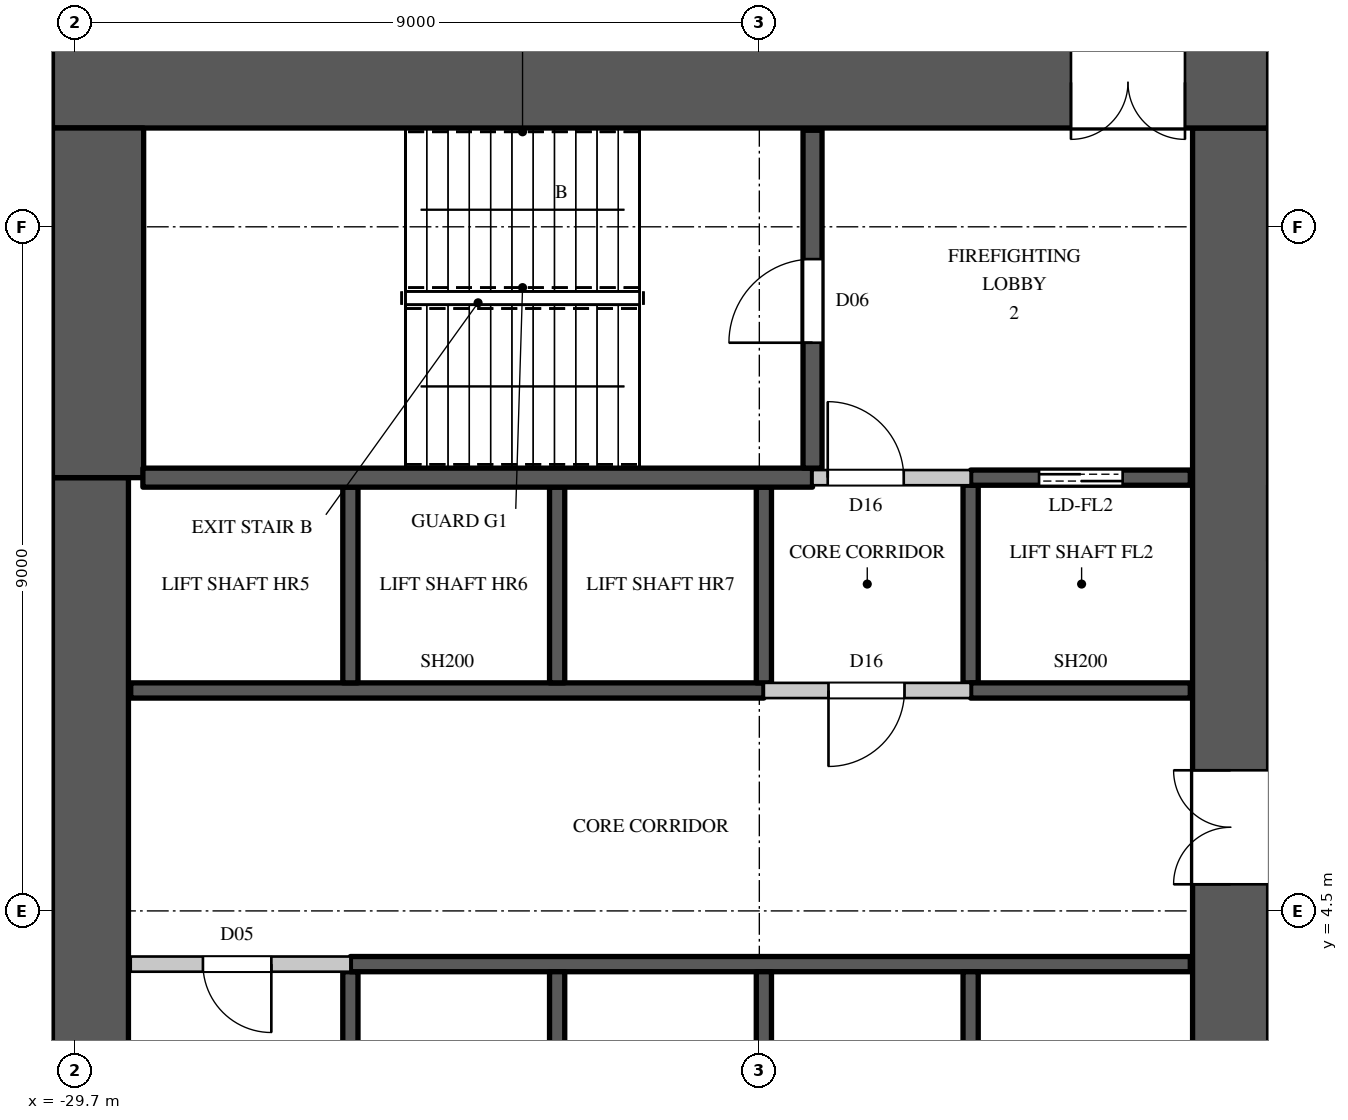
"""IFC4 building model, lengths in metres.
Left out: names, types, materials, properties, quantities, classifications, styles, units other than length and angle.
Written with IfcOpenShell. Run it as: python <this file> out.ifc"""

import sys

from ifc_helpers import new_model, si_unit, direction, frame, frame_2d, origin, place, context, subcontext, project, spatial, rectangle, extrude, element, fill, save


model = new_model("IFC4")
c1 = context("Model", 3, precision=1e-05, world=origin(), true_north=direction((0.0, 1.0)))
c2 = subcontext(c1, "Body", "Model", "MODEL_VIEW")
j1 = project(units=[si_unit("LENGTHUNIT", "METRE"), si_unit("PLANEANGLEUNIT", "RADIAN")], contexts=[c1])
p1 = place(None, origin())
s1 = spatial("IfcSite", under=j1, at=p1, CompositionType="ELEMENT")
p2 = place(p1, origin())
s2 = spatial("IfcBuilding", under=s1, at=p2, CompositionType="ELEMENT")
p3 = place(p2, frame((0.0, 0.0, 152.5)))
s3 = spatial("IfcBuildingStorey", under=s2, at=p3, CompositionType="ELEMENT", Elevation=152.5)
p4 = place(p3, frame((-30.0, 15.4, 0.0), z_axis=(0.0, 0.0, 1.0), x_axis=(1.0, 0.0, 0.0)))
e1 = element("IfcWall", 1, at=p4, inside=s3, PredefinedType="SHEAR", context=c2, shape_type="SweptSolid", body=[
    extrude(rectangle(XDim=16.0, YDim=1.2, at=frame_2d((8.0, 0.0))), origin(), (0.0, 0.0, 1.0), 8.0),
])
p5 = place(p4, frame((13.4, 0.0, 0.0)))
e2 = element("IfcOpeningElement", 2, at=p5, cuts=e1, PredefinedType="OPENING", context=c2, shape_type="SweptSolid", body=[
    extrude(rectangle(XDim=1.5, YDim=2.4, at=frame_2d((0.75, 1.2))), frame((0.0, 0.61, 0.0), z_axis=(0.0, -1.0, 0.0), x_axis=(1.0, 0.0, 0.0)), (0.0, 0.0, 1.0), 1.22),
])
p6 = place(p3, frame((-14.5, -14.8, 0.0), z_axis=(0.0, 0.0, 1.0), x_axis=(0.0, 1.0, 0.0)))
e3 = element("IfcWall", 3, at=p6, inside=s3, PredefinedType="SHEAR", context=c2, shape_type="SweptSolid", body=[
    extrude(rectangle(XDim=29.6, YDim=1.0, at=frame_2d((14.8, 0.0))), origin(), (0.0, 0.0, 1.0), 8.0),
])
p7 = place(p6, frame((8.45, 0.0, 0.0)))
e4 = element("IfcOpeningElement", 4, at=p7, cuts=e3, PredefinedType="OPENING", context=c2, shape_type="SweptSolid", body=[
    extrude(rectangle(XDim=1.5, YDim=2.4, at=frame_2d((0.75, 1.2))), frame((0.0, 0.51, 0.0), z_axis=(0.0, -1.0, 0.0), x_axis=(1.0, 0.0, 0.0)), (0.0, 0.0, 1.0), 1.02),
])
p8 = place(p6, frame((19.65, 0.0, 0.0)))
e5 = element("IfcOpeningElement", 5, at=p8, cuts=e3, PredefinedType="OPENING", context=c2, shape_type="SweptSolid", body=[
    extrude(rectangle(XDim=1.5, YDim=2.4, at=frame_2d((0.75, 1.2))), frame((0.0, 0.51, 0.0), z_axis=(0.0, -1.0, 0.0), x_axis=(1.0, 0.0, 0.0)), (0.0, 0.0, 1.0), 1.02),
])
p9 = place(p6, frame((14.5, 0.0, 0.0)))
e6 = element("IfcOpeningElement", 6, at=p9, cuts=e3, PredefinedType="OPENING", context=c2, shape_type="SweptSolid", body=[
    extrude(rectangle(XDim=0.6, YDim=2.0, at=frame_2d((0.3, 1.0))), frame((0.0, 0.51, 0.0), z_axis=(0.0, -1.0, 0.0), x_axis=(1.0, 0.0, 0.0)), (0.0, 0.0, 1.0), 1.02),
])
p10 = place(p3, frame((-29.5, -10.2, 0.0), z_axis=(0.0, 0.0, 1.0), x_axis=(0.0, 1.0, 0.0)))
e7 = element("IfcWall", 7, at=p10, inside=s3, PredefinedType="SHEAR", context=c2, shape_type="SweptSolid", body=[
    extrude(rectangle(XDim=20.4, YDim=1.0, at=frame_2d((10.2, 0.0))), origin(), (0.0, 0.0, 1.0), 8.0),
])
p11 = place(p3, frame((-29.4, 10.2, 0.0), z_axis=(0.0, 0.0, 1.0), x_axis=(0.0, 1.0, 0.0)))
e8 = element("IfcWall", 8, at=p11, inside=s3, PredefinedType="SHEAR", context=c2, shape_type="SweptSolid", body=[
    extrude(rectangle(XDim=4.6, YDim=1.2, at=frame_2d((2.3, 0.0))), origin(), (0.0, 0.0, 1.0), 8.0),
])
p12 = place(p3, frame((-28.97, 3.8, 0.0), z_axis=(0.0, 0.0, 1.0), x_axis=(1.0, 0.0, 0.0)))
e9 = element("IfcWall", 9, at=p12, inside=s3, PredefinedType="PARTITIONING", context=c2, shape_type="SweptSolid", body=[
    extrude(rectangle(XDim=2.89, YDim=0.2, at=frame_2d((1.445, 0.0))), origin(), (0.0, 0.0, 1.0), 7.7),
])
p13 = place(p12, frame((0.95, 0.0, 0.0)))
e10 = element("IfcOpeningElement", 10, at=p13, cuts=e9, PredefinedType="OPENING", context=c2, shape_type="SweptSolid", body=[
    extrude(rectangle(XDim=0.9, YDim=2.2, at=frame_2d((0.45, 1.1))), frame((0.0, 0.11, 0.0), z_axis=(0.0, -1.0, 0.0), x_axis=(1.0, 0.0, 0.0)), (0.0, 0.0, 1.0), 0.22),
])
p14 = place(p3, frame((-20.64, 7.4, 0.0), z_axis=(0.0, 0.0, 1.0), x_axis=(1.0, 0.0, 0.0)))
e11 = element("IfcWall", 11, at=p14, inside=s3, PredefinedType="PARTITIONING", context=c2, shape_type="SweptSolid", body=[
    extrude(rectangle(XDim=2.72, YDim=0.2, at=frame_2d((1.36, 0.0))), origin(), (0.0, 0.0, 1.0), 7.7),
])
p15 = place(p14, frame((0.85, 0.0, 0.0)))
e12 = element("IfcOpeningElement", 12, at=p15, cuts=e11, PredefinedType="OPENING", context=c2, shape_type="SweptSolid", body=[
    extrude(rectangle(XDim=1.0, YDim=2.2, at=frame_2d((0.5, 1.1))), frame((0.0, 0.11, 0.0), z_axis=(0.0, -1.0, 0.0), x_axis=(1.0, 0.0, 0.0)), (0.0, 0.0, 1.0), 0.22),
])
p16 = place(p3, frame((-20.0, 10.2, 0.0), z_axis=(0.0, 0.0, 1.0), x_axis=(1.0, 0.0, 0.0)))
e13 = element("IfcWall", 13, at=p16, inside=s3, PredefinedType="PARTITIONING", context=c2, shape_type="SweptSolid", body=[
    extrude(rectangle(XDim=2.08, YDim=0.2, at=frame_2d((1.04, 0.0))), origin(), (0.0, 0.0, 1.0), 7.7),
])
p17 = place(p16, frame((0.2, 0.0, 0.0)))
e14 = element("IfcOpeningElement", 14, at=p17, cuts=e13, PredefinedType="OPENING", context=c2, shape_type="SweptSolid", body=[
    extrude(rectangle(XDim=1.0, YDim=2.2, at=frame_2d((0.5, 1.1))), frame((0.0, 0.11, 0.0), z_axis=(0.0, -1.0, 0.0), x_axis=(1.0, 0.0, 0.0)), (0.0, 0.0, 1.0), 0.22),
])
p18 = place(p3, frame((-28.97, 7.4, 0.0), z_axis=(0.0, 0.0, 1.0), x_axis=(1.0, 0.0, 0.0)))
e15 = element("IfcWall", 15, at=p18, inside=s3, PredefinedType="SHEAR", context=c2, shape_type="SweptSolid", body=[
    extrude(rectangle(XDim=8.33, YDim=0.2, at=frame_2d((4.165, 0.0))), origin(), (0.0, 0.0, 1.0), 7.7),
])
p19 = place(p3, frame((-26.08, 1.1, 0.0), z_axis=(0.0, 0.0, 1.0), x_axis=(0.0, 1.0, 0.0)))
e16 = element("IfcWall", 16, at=p19, inside=s3, PredefinedType="SHEAR", context=c2, shape_type="SweptSolid", body=[
    extrude(rectangle(XDim=2.6, YDim=0.2, at=frame_2d((1.3, 0.0))), origin(), (0.0, 0.0, 1.0), 7.7),
])
p20 = place(p3, frame((-26.08, 3.8, 0.0), z_axis=(0.0, 0.0, 1.0), x_axis=(1.0, 0.0, 0.0)))
e17 = element("IfcWall", 17, at=p20, inside=s3, PredefinedType="SHEAR", context=c2, shape_type="SweptSolid", body=[
    extrude(rectangle(XDim=11.05, YDim=0.2, at=frame_2d((5.525, 0.0))), origin(), (0.0, 0.0, 1.0), 7.7),
])
p21 = place(p3, frame((-26.08, 7.5, 0.0), z_axis=(0.0, 0.0, 1.0), x_axis=(0.0, 1.0, 0.0)))
e18 = element("IfcWall", 18, at=p21, inside=s3, PredefinedType="SHEAR", context=c2, shape_type="SweptSolid", body=[
    extrude(rectangle(XDim=2.575, YDim=0.2, at=frame_2d((1.288, 0.0))), origin(), (0.0, 0.0, 1.0), 8.0),
])
p22 = place(p3, frame((-23.36, 1.1, 0.0), z_axis=(0.0, 0.0, 1.0), x_axis=(0.0, 1.0, 0.0)))
e19 = element("IfcWall", 19, at=p22, inside=s3, PredefinedType="SHEAR", context=c2, shape_type="SweptSolid", body=[
    extrude(rectangle(XDim=2.6, YDim=0.2, at=frame_2d((1.3, 0.0))), origin(), (0.0, 0.0, 1.0), 8.0),
])
p23 = place(p3, frame((-23.36, 7.5, 0.0), z_axis=(0.0, 0.0, 1.0), x_axis=(0.0, 1.0, 0.0)))
e20 = element("IfcWall", 20, at=p23, inside=s3, PredefinedType="SHEAR", context=c2, shape_type="SweptSolid", body=[
    extrude(rectangle(XDim=2.575, YDim=0.2, at=frame_2d((1.288, 0.0))), origin(), (0.0, 0.0, 1.0), 8.0),
])
p24 = place(p3, frame((-20.64, 1.1, 0.0), z_axis=(0.0, 0.0, 1.0), x_axis=(0.0, 1.0, 0.0)))
e21 = element("IfcWall", 21, at=p24, inside=s3, PredefinedType="SHEAR", context=c2, shape_type="SweptSolid", body=[
    extrude(rectangle(XDim=2.6, YDim=0.2, at=frame_2d((1.3, 0.0))), origin(), (0.0, 0.0, 1.0), 8.0),
])
p25 = place(p3, frame((-20.64, 7.5, 0.0), z_axis=(0.0, 0.0, 1.0), x_axis=(0.0, 1.0, 0.0)))
e22 = element("IfcWall", 22, at=p25, inside=s3, PredefinedType="SHEAR", context=c2, shape_type="SweptSolid", body=[
    extrude(rectangle(XDim=2.575, YDim=0.2, at=frame_2d((1.288, 0.0))), origin(), (0.0, 0.0, 1.0), 7.7),
])
p26 = place(p3, frame((-17.92, 1.1, 0.0), z_axis=(0.0, 0.0, 1.0), x_axis=(0.0, 1.0, 0.0)))
e23 = element("IfcWall", 23, at=p26, inside=s3, PredefinedType="SHEAR", context=c2, shape_type="SweptSolid", body=[
    extrude(rectangle(XDim=2.6, YDim=0.2, at=frame_2d((1.3, 0.0))), origin(), (0.0, 0.0, 1.0), 8.0),
])
p27 = place(p3, frame((-17.92, 7.5, 0.0), z_axis=(0.0, 0.0, 1.0), x_axis=(0.0, 1.0, 0.0)))
e24 = element("IfcWall", 24, at=p27, inside=s3, PredefinedType="SHEAR", context=c2, shape_type="SweptSolid", body=[
    extrude(rectangle(XDim=2.6, YDim=0.2, at=frame_2d((1.3, 0.0))), origin(), (0.0, 0.0, 1.0), 7.7),
])
p28 = place(p3, frame((-17.92, 7.4, 0.0), z_axis=(0.0, 0.0, 1.0), x_axis=(1.0, 0.0, 0.0)))
e25 = element("IfcWall", 25, at=p28, inside=s3, PredefinedType="SHEAR", context=c2, shape_type="SweptSolid", body=[
    extrude(rectangle(XDim=2.89, YDim=0.2, at=frame_2d((1.445, 0.0))), origin(), (0.0, 0.0, 1.0), 7.7),
])
p29 = place(p3, frame((-17.92, 10.2, 0.0), z_axis=(0.0, 0.0, 1.0), x_axis=(1.0, 0.0, 0.0)))
e26 = element("IfcWall", 26, at=p29, inside=s3, PredefinedType="SHEAR", context=c2, shape_type="SweptSolid", body=[
    extrude(rectangle(XDim=2.89, YDim=0.2, at=frame_2d((1.445, 0.0))), origin(), (0.0, 0.0, 1.0), 7.7),
])
p30 = place(p29, frame((0.9, 0.0, 0.0)))
e27 = element("IfcOpeningElement", 27, at=p30, cuts=e26, PredefinedType="OPENING", context=c2, shape_type="SweptSolid", body=[
    extrude(rectangle(XDim=1.1, YDim=2.2, at=frame_2d((0.55, 1.1))), frame((0.0, 0.11, 0.0), z_axis=(0.0, -1.0, 0.0), x_axis=(1.0, 0.0, 0.0)), (0.0, 0.0, 1.0), 0.22),
])
p31 = place(p3, frame((-28.81, 10.2, 0.0), z_axis=(0.0, 0.0, 1.0), x_axis=(1.0, 0.0, 0.0)))
e28 = element("IfcWall", 28, at=p31, inside=s3, PredefinedType="SHEAR", context=c2, shape_type="SweptSolid", body=[
    extrude(rectangle(XDim=8.81, YDim=0.25, at=frame_2d((4.405, 0.0))), origin(), (0.0, 0.0, 1.0), 7.7),
])
p32 = place(p3, frame((-20.0, 10.325, 0.0), z_axis=(0.0, 0.0, 1.0), x_axis=(0.0, 1.0, 0.0)))
e29 = element("IfcWall", 29, at=p32, inside=s3, PredefinedType="SHEAR", context=c2, shape_type="SweptSolid", body=[
    extrude(rectangle(XDim=4.445, YDim=0.25, at=frame_2d((2.223, 0.0))), origin(), (0.0, 0.0, 1.0), 7.7),
])
p33 = place(p32, frame((1.65, 0.0, 0.0)))
e30 = element("IfcOpeningElement", 30, at=p33, cuts=e29, PredefinedType="OPENING", context=c2, shape_type="SweptSolid", body=[
    extrude(rectangle(XDim=1.1, YDim=2.2, at=frame_2d((0.55, 1.1))), frame((0.0, 0.135, 0.0), z_axis=(0.0, -1.0, 0.0), x_axis=(1.0, 0.0, 0.0)), (0.0, 0.0, 1.0), 0.27),
])
p34 = place(p33, origin())
e31 = element("IfcDoor", 31, at=p34, inside=s3, OperationType="SINGLE_SWING_LEFT", PredefinedType="DOOR", context=c2, shape_type="SweptSolid", body=[
    extrude(rectangle(XDim=1.1, YDim=2.2, at=frame_2d((0.55, 1.1))), frame((0.0, 0.025, 0.0), z_axis=(0.0, -1.0, 0.0), x_axis=(1.0, 0.0, 0.0)), (0.0, 0.0, 1.0), 0.05),
])
fill(e30, e31)
p35 = place(p15, origin())
e32 = element("IfcDoor", 32, at=p35, inside=s3, OperationType="SINGLE_SWING_RIGHT", PredefinedType="DOOR", context=c2, shape_type="SweptSolid", body=[
    extrude(rectangle(XDim=1.0, YDim=2.2, at=frame_2d((0.5, 1.1))), frame((0.0, 0.025, 0.0), z_axis=(0.0, -1.0, 0.0), x_axis=(1.0, 0.0, 0.0)), (0.0, 0.0, 1.0), 0.05),
])
fill(e12, e32)
p36 = place(p17, origin())
e33 = element("IfcDoor", 33, at=p36, inside=s3, OperationType="SINGLE_SWING_LEFT", PredefinedType="DOOR", context=c2, shape_type="SweptSolid", body=[
    extrude(rectangle(XDim=1.0, YDim=2.2, at=frame_2d((0.5, 1.1))), frame((0.0, 0.025, 0.0), z_axis=(0.0, -1.0, 0.0), x_axis=(1.0, 0.0, 0.0)), (0.0, 0.0, 1.0), 0.05),
])
fill(e14, e33)
p37 = place(p13, origin())
e34 = element("IfcDoor", 34, at=p37, inside=s3, OperationType="SINGLE_SWING_LEFT", PredefinedType="DOOR", context=c2, shape_type="SweptSolid", body=[
    extrude(rectangle(XDim=0.9, YDim=2.2, at=frame_2d((0.45, 1.1))), frame((0.0, 0.025, 0.0), z_axis=(0.0, -1.0, 0.0), x_axis=(1.0, 0.0, 0.0)), (0.0, 0.0, 1.0), 0.05),
])
fill(e10, e34)
p38 = place(p30, origin())
e35 = element("IfcDoor", 35, at=p38, inside=s3, OperationType="DOUBLE_DOOR_SLIDING", PredefinedType="DOOR", context=c2, shape_type="SweptSolid", body=[
    extrude(rectangle(XDim=1.1, YDim=2.2, at=frame_2d((0.55, 1.1))), frame((0.0, 0.025, 0.0), z_axis=(0.0, -1.0, 0.0), x_axis=(1.0, 0.0, 0.0)), (0.0, 0.0, 1.0), 0.05),
])
fill(e27, e35)
p39 = place(p5, origin())
e36 = element("IfcDoor", 36, at=p39, inside=s3, OperationType="DOUBLE_DOOR_SINGLE_SWING", PredefinedType="DOOR", context=c2, shape_type="SweptSolid", body=[
    extrude(rectangle(XDim=1.5, YDim=2.4, at=frame_2d((0.75, 1.2))), frame((0.0, 0.025, 0.0), z_axis=(0.0, -1.0, 0.0), x_axis=(1.0, 0.0, 0.0)), (0.0, 0.0, 1.0), 0.05),
])
fill(e2, e36)
p40 = place(p8, origin())
e37 = element("IfcDoor", 37, at=p40, inside=s3, OperationType="DOUBLE_DOOR_SINGLE_SWING", PredefinedType="DOOR", context=c2, shape_type="SweptSolid", body=[
    extrude(rectangle(XDim=1.5, YDim=2.4, at=frame_2d((0.75, 1.2))), frame((0.0, 0.495, 0.0), z_axis=(0.0, -1.0, 0.0), x_axis=(1.0, 0.0, 0.0)), (0.0, 0.0, 1.0), 0.05),
])
fill(e5, e37)
save(model, sys.argv[1])
